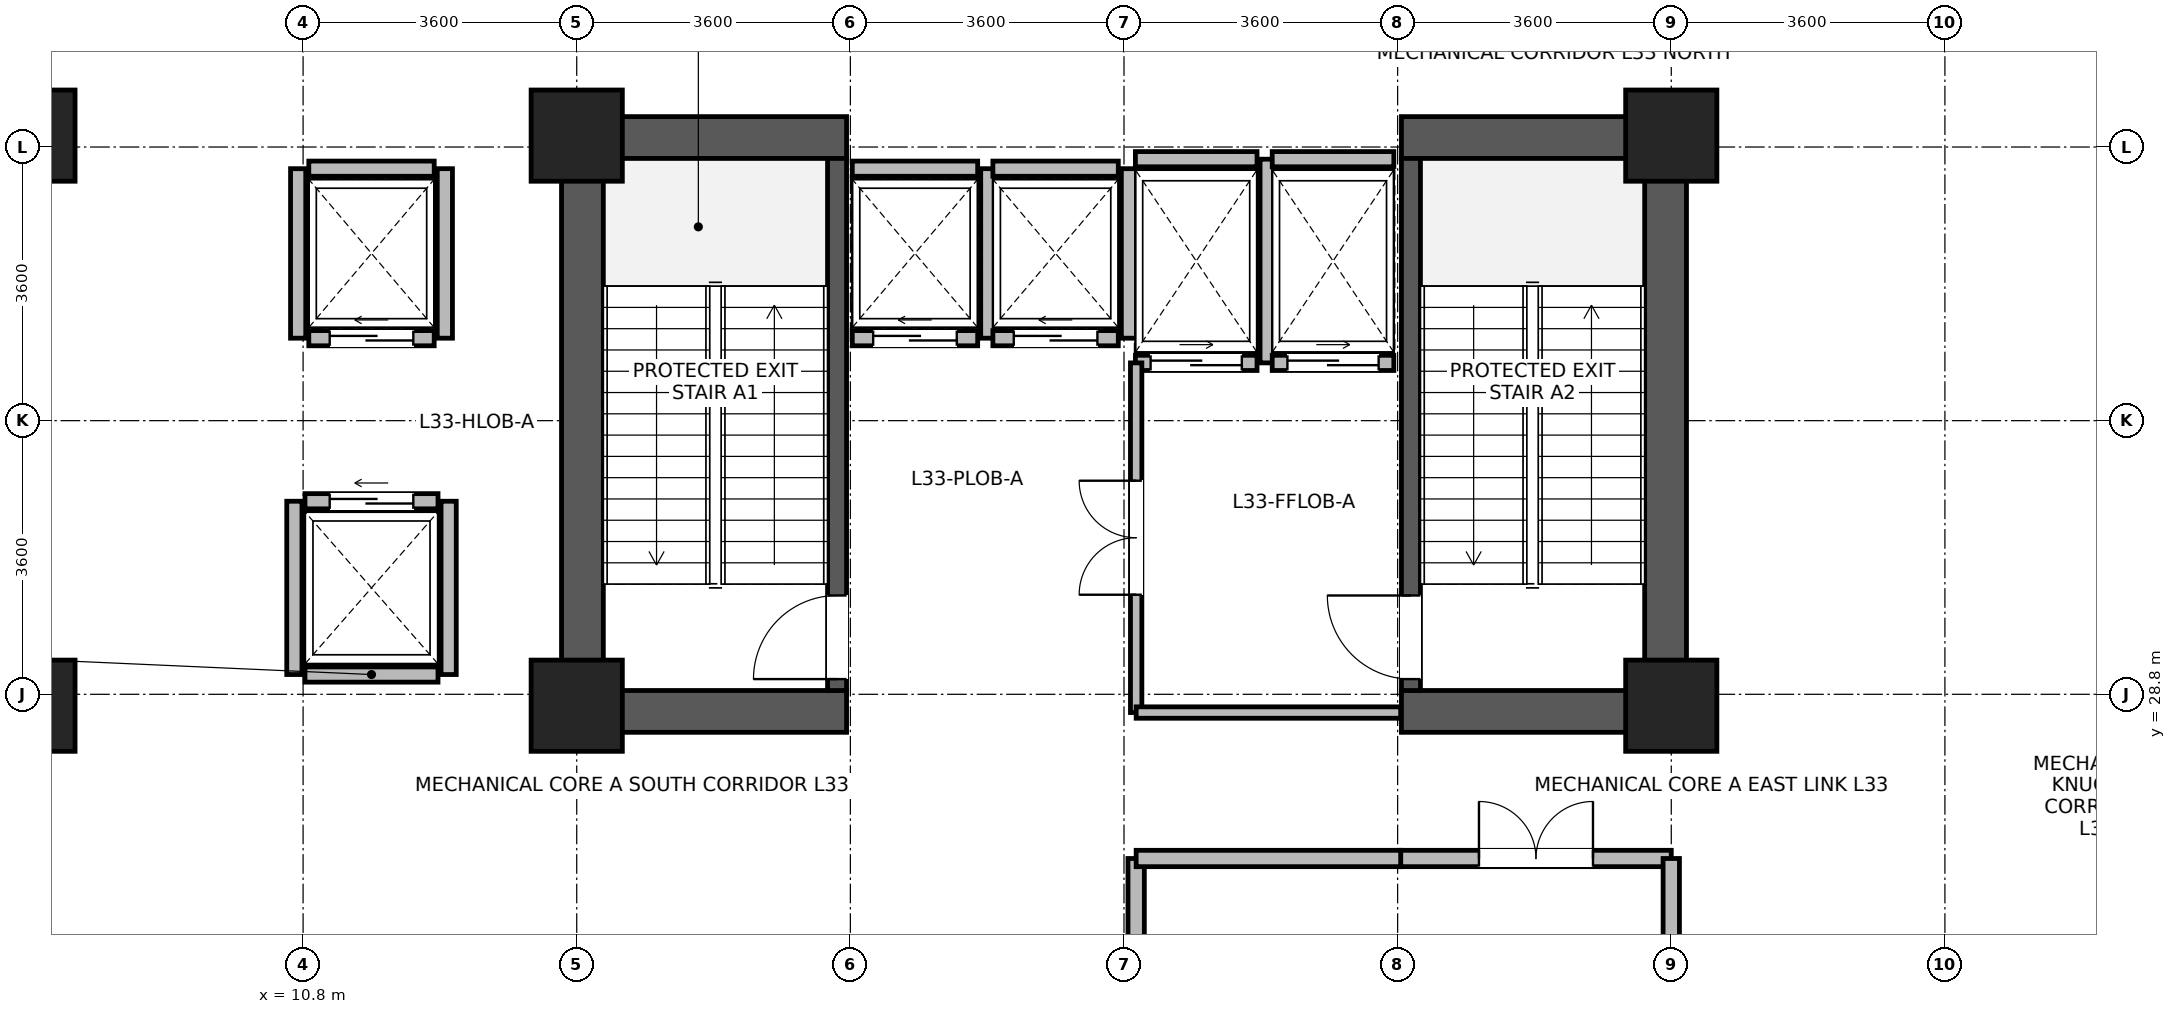
"""IFC4 building model, lengths in metres.
Left out: names, types, materials, properties, quantities, classifications, styles, units other than length and angle.
Written with IfcOpenShell. Run it as: python <this file> out.ifc"""

import sys

from ifc_helpers import new_model, si_unit, direction, frame, frame_2d, origin, origin_2d, place, context, subcontext, project, spatial, rectangle, extrude, source, transform, mapped, element, fill, save


model = new_model("IFC4")
c1 = context("Model", 3, precision=1e-05, world=origin(), true_north=direction((0.0, 1.0)))
c2 = subcontext(c1, "Body", "Model", "MODEL_VIEW")
j1 = project(units=[si_unit("LENGTHUNIT", "METRE"), si_unit("PLANEANGLEUNIT", "RADIAN")], contexts=[c1])
p1 = place(None, origin())
s1 = spatial("IfcSite", under=j1, at=p1, CompositionType="ELEMENT")
p2 = place(p1, origin())
s2 = spatial("IfcBuilding", under=s1, at=p2, CompositionType="ELEMENT")
p3 = place(p2, frame((0.0, 0.0, 130.4)))
s3 = spatial("IfcBuildingStorey", under=s2, at=p3, CompositionType="ELEMENT", Elevation=130.4)
for number, where, z_axis, x_axis in (
    (1, (14.475, 28.3, 0.0), (0.0, 0.0, 1.0), (0.0, 1.0, 0.0)),
    (2, (28.725, 28.3, 0.0), (0.0, 0.0, 1.0), (0.0, 1.0, 0.0)),
):
    element("IfcWall", number, at=place(p3, frame(where, z_axis=z_axis, x_axis=x_axis)), inside=s3, PredefinedType="SHEAR", context=c2, shape_type="SweptSolid", body=[
        extrude(rectangle(XDim=8.1, YDim=0.55, at=frame_2d((4.05, 0.0))), origin(), (0.0, 0.0, 1.0), 4.78),
    ])
for number, where, z_axis, x_axis in (
    (3, (14.75, 28.575, 0.0), (0.0, 0.0, 1.0), (1.0, 0.0, 0.0)),
    (4, (25.25, 28.575, 0.0), (0.0, 0.0, 1.0), (1.0, 0.0, 0.0)),
    (5, (14.75, 36.125, 0.0), (0.0, 0.0, 1.0), (1.0, 0.0, 0.0)),
    (6, (25.25, 36.125, 0.0), (0.0, 0.0, 1.0), (1.0, 0.0, 0.0)),
):
    element("IfcWall", number, at=place(p3, frame(where, z_axis=z_axis, x_axis=x_axis)), inside=s3, PredefinedType="SHEAR", context=c2, shape_type="SweptSolid", body=[
        extrude(rectangle(XDim=3.2, YDim=0.55, at=frame_2d((1.6, 0.0))), origin(), (0.0, 0.0, 1.0), 4.78),
    ])
p4 = place(p3, frame((17.825, 28.85, 0.0), z_axis=(0.0, 0.0, 1.0), x_axis=(0.0, 1.0, 0.0)))
e7 = element("IfcWall", 7, at=p4, inside=s3, PredefinedType="SHEAR", context=c2, shape_type="SweptSolid", body=[
    extrude(rectangle(XDim=7.0, YDim=0.25, at=frame_2d((3.5, 0.0))), origin(), (0.0, 0.0, 1.0), 4.78),
])
p5 = place(p4, frame((0.15, 0.0, 0.0)))
e8 = element("IfcOpeningElement", 8, at=p5, cuts=e7, PredefinedType="OPENING", context=c2, shape_type="SweptSolid", body=[
    extrude(rectangle(XDim=1.1, YDim=2.08, at=frame_2d((0.55, 1.04))), frame((0.0, 0.135, 0.0), z_axis=(0.0, -1.0, 0.0), x_axis=(1.0, 0.0, 0.0)), (0.0, 0.0, 1.0), 0.27),
])
p6 = place(p3, frame((25.375, 28.85, 0.0), z_axis=(0.0, 0.0, 1.0), x_axis=(0.0, 1.0, 0.0)))
e9 = element("IfcWall", 9, at=p6, inside=s3, PredefinedType="SHEAR", context=c2, shape_type="SweptSolid", body=[
    extrude(rectangle(XDim=7.0, YDim=0.25, at=frame_2d((3.5, 0.0))), origin(), (0.0, 0.0, 1.0), 4.78),
])
p7 = place(p6, frame((0.15, 0.0, 0.0)))
e10 = element("IfcOpeningElement", 10, at=p7, cuts=e9, PredefinedType="OPENING", context=c2, shape_type="SweptSolid", body=[
    extrude(rectangle(XDim=1.1, YDim=2.08, at=frame_2d((0.55, 1.04))), frame((0.0, 0.135, 0.0), z_axis=(0.0, -1.0, 0.0), x_axis=(1.0, 0.0, 0.0)), (0.0, 0.0, 1.0), 0.27),
])
m1 = source(origin(), c2, "Body", "SweptSolid", [
    extrude(rectangle(XDim=1.2, YDim=1.2, at=origin_2d()), origin(), (0.0, 0.0, 1.0), 5.2),
])
for number, where, z_axis, x_axis in (
    (11, (7.2, 28.65, 0.0), (0.0, 0.0, 1.0), (1.0, 0.0, 0.0)),
    (12, (7.2, 36.15, 0.0), (0.0, 0.0, 1.0), (1.0, 0.0, 0.0)),
    (13, (14.4, 28.65, 0.0), (0.0, 0.0, 1.0), (1.0, 0.0, 0.0)),
    (14, (14.4, 36.15, 0.0), (0.0, 0.0, 1.0), (1.0, 0.0, 0.0)),
    (15, (28.8, 28.65, 0.0), (0.0, 0.0, 1.0), (1.0, 0.0, 0.0)),
    (16, (28.8, 36.15, 0.0), (0.0, 0.0, 1.0), (1.0, 0.0, 0.0)),
):
    element("IfcColumn", number, at=place(p3, frame(where, z_axis=z_axis, x_axis=x_axis)), inside=s3, PredefinedType="COLUMN", context=c2, shape_type="MappedRepresentation", body=[
        mapped(m1, transform((0.0, 0.0, 0.0), x_axis=(1.0, 0.0, 0.0), y_axis=(0.0, 1.0, 0.0), z_axis=(0.0, 0.0, 1.0), scale=1.0)),
    ])
p8 = place(p3, frame((18.025, 33.485, 0.0), z_axis=(0.0, 0.0, 1.0), x_axis=(1.0, 0.0, 0.0)))
e17 = element("IfcWall", 17, at=p8, inside=s3, PredefinedType="PARTITIONING", context=c2, shape_type="SweptSolid", body=[
    extrude(rectangle(XDim=1.65, YDim=0.2, at=frame_2d((0.825, 0.0))), origin(), (0.0, 0.0, 1.0), 4.76),
])
p9 = place(p8, frame((0.275, 0.0, 0.0)))
e18 = element("IfcOpeningElement", 18, at=p9, cuts=e17, PredefinedType="OPENING", context=c2, shape_type="SweptSolid", body=[
    extrude(rectangle(XDim=1.1, YDim=2.12, at=frame_2d((0.55, 1.06))), frame((0.0, 0.11, 0.0), z_axis=(0.0, -1.0, 0.0), x_axis=(1.0, 0.0, 0.0)), (0.0, 0.0, 1.0), 0.22),
])
p10 = place(p3, frame((18.025, 35.715, 0.0), z_axis=(0.0, 0.0, 1.0), x_axis=(1.0, 0.0, 0.0)))
e19 = element("IfcWall", 19, at=p10, inside=s3, PredefinedType="PARTITIONING", context=c2, shape_type="SweptSolid", body=[
    extrude(rectangle(XDim=1.65, YDim=0.2, at=frame_2d((0.825, 0.0))), origin(), (0.0, 0.0, 1.0), 4.76),
])
p11 = place(p3, frame((19.815, 33.485, 0.0), z_axis=(0.0, 0.0, 1.0), x_axis=(0.0, 1.0, 0.0)))
e20 = element("IfcWall", 20, at=p11, inside=s3, PredefinedType="PARTITIONING", context=c2, shape_type="SweptSolid", body=[
    extrude(rectangle(XDim=2.23, YDim=0.2, at=frame_2d((1.115, 0.0))), origin(), (0.0, 0.0, 1.0), 4.76),
])
p12 = place(p3, frame((19.875, 33.485, 0.0), z_axis=(0.0, 0.0, 1.0), x_axis=(1.0, 0.0, 0.0)))
e21 = element("IfcWall", 21, at=p12, inside=s3, PredefinedType="PARTITIONING", context=c2, shape_type="SweptSolid", body=[
    extrude(rectangle(XDim=1.65, YDim=0.2, at=frame_2d((0.825, 0.0))), origin(), (0.0, 0.0, 1.0), 4.76),
])
p13 = place(p12, frame((0.275, 0.0, 0.0)))
e22 = element("IfcOpeningElement", 22, at=p13, cuts=e21, PredefinedType="OPENING", context=c2, shape_type="SweptSolid", body=[
    extrude(rectangle(XDim=1.1, YDim=2.12, at=frame_2d((0.55, 1.06))), frame((0.0, 0.11, 0.0), z_axis=(0.0, -1.0, 0.0), x_axis=(1.0, 0.0, 0.0)), (0.0, 0.0, 1.0), 0.22),
])
p14 = place(p3, frame((19.875, 35.715, 0.0), z_axis=(0.0, 0.0, 1.0), x_axis=(1.0, 0.0, 0.0)))
e23 = element("IfcWall", 23, at=p14, inside=s3, PredefinedType="PARTITIONING", context=c2, shape_type="SweptSolid", body=[
    extrude(rectangle(XDim=1.65, YDim=0.2, at=frame_2d((0.825, 0.0))), origin(), (0.0, 0.0, 1.0), 4.76),
])
p15 = place(p3, frame((21.665, 33.485, 0.0), z_axis=(0.0, 0.0, 1.0), x_axis=(0.0, 1.0, 0.0)))
e24 = element("IfcWall", 24, at=p15, inside=s3, PredefinedType="PARTITIONING", context=c2, shape_type="SweptSolid", body=[
    extrude(rectangle(XDim=2.23, YDim=0.2, at=frame_2d((1.115, 0.0))), origin(), (0.0, 0.0, 1.0), 4.76),
])
p16 = place(p3, frame((10.825, 29.06, 0.0), z_axis=(0.0, 0.0, 1.0), x_axis=(1.0, 0.0, 0.0)))
e25 = element("IfcWall", 25, at=p16, inside=s3, PredefinedType="PARTITIONING", context=c2, shape_type="SweptSolid", body=[
    extrude(rectangle(XDim=1.75, YDim=0.2, at=frame_2d((0.875, 0.0))), origin(), (0.0, 0.0, 1.0), 4.76),
])
p17 = place(p3, frame((10.825, 31.34, 0.0), z_axis=(0.0, 0.0, 1.0), x_axis=(1.0, 0.0, 0.0)))
e26 = element("IfcWall", 26, at=p17, inside=s3, PredefinedType="PARTITIONING", context=c2, shape_type="SweptSolid", body=[
    extrude(rectangle(XDim=1.75, YDim=0.2, at=frame_2d((0.875, 0.0))), origin(), (0.0, 0.0, 1.0), 4.76),
])
p18 = place(p17, frame((0.325, 0.0, 0.0)))
e27 = element("IfcOpeningElement", 27, at=p18, cuts=e26, PredefinedType="OPENING", context=c2, shape_type="SweptSolid", body=[
    extrude(rectangle(XDim=1.1, YDim=2.12, at=frame_2d((0.55, 1.06))), frame((0.0, 0.11, 0.0), z_axis=(0.0, -1.0, 0.0), x_axis=(1.0, 0.0, 0.0)), (0.0, 0.0, 1.0), 0.22),
])
for number, where, z_axis, x_axis in (
    (28, (10.685, 29.06, 0.0), (0.0, 0.0, 1.0), (0.0, 1.0, 0.0)),
    (29, (12.715, 29.06, 0.0), (0.0, 0.0, 1.0), (0.0, 1.0, 0.0)),
):
    element("IfcWall", number, at=place(p3, frame(where, z_axis=z_axis, x_axis=x_axis)), inside=s3, PredefinedType="PARTITIONING", context=c2, shape_type="SweptSolid", body=[
        extrude(rectangle(XDim=2.28, YDim=0.2, at=frame_2d((1.14, 0.0))), origin(), (0.0, 0.0, 1.0), 4.76),
    ])
p19 = place(p3, frame((10.875, 33.485, 0.0), z_axis=(0.0, 0.0, 1.0), x_axis=(1.0, 0.0, 0.0)))
e30 = element("IfcWall", 30, at=p19, inside=s3, PredefinedType="PARTITIONING", context=c2, shape_type="SweptSolid", body=[
    extrude(rectangle(XDim=1.65, YDim=0.2, at=frame_2d((0.825, 0.0))), origin(), (0.0, 0.0, 1.0), 4.76),
])
p20 = place(p19, frame((0.275, 0.0, 0.0)))
e31 = element("IfcOpeningElement", 31, at=p20, cuts=e30, PredefinedType="OPENING", context=c2, shape_type="SweptSolid", body=[
    extrude(rectangle(XDim=1.1, YDim=2.12, at=frame_2d((0.55, 1.06))), frame((0.0, 0.11, 0.0), z_axis=(0.0, -1.0, 0.0), x_axis=(1.0, 0.0, 0.0)), (0.0, 0.0, 1.0), 0.22),
])
p21 = place(p3, frame((10.875, 35.715, 0.0), z_axis=(0.0, 0.0, 1.0), x_axis=(1.0, 0.0, 0.0)))
e32 = element("IfcWall", 32, at=p21, inside=s3, PredefinedType="PARTITIONING", context=c2, shape_type="SweptSolid", body=[
    extrude(rectangle(XDim=1.65, YDim=0.2, at=frame_2d((0.825, 0.0))), origin(), (0.0, 0.0, 1.0), 4.76),
])
for number, where, z_axis, x_axis in (
    (33, (10.735, 33.485, 0.0), (0.0, 0.0, 1.0), (0.0, 1.0, 0.0)),
    (34, (12.665, 33.485, 0.0), (0.0, 0.0, 1.0), (0.0, 1.0, 0.0)),
):
    element("IfcWall", number, at=place(p3, frame(where, z_axis=z_axis, x_axis=x_axis)), inside=s3, PredefinedType="PARTITIONING", context=c2, shape_type="SweptSolid", body=[
        extrude(rectangle(XDim=2.23, YDim=0.2, at=frame_2d((1.115, 0.0))), origin(), (0.0, 0.0, 1.0), 4.76),
    ])
p22 = place(p3, frame((21.75, 33.16, 0.0), z_axis=(0.0, 0.0, 1.0), x_axis=(1.0, 0.0, 0.0)))
e35 = element("IfcWall", 35, at=p22, inside=s3, PredefinedType="PARTITIONING", context=c2, shape_type="SweptSolid", body=[
    extrude(rectangle(XDim=1.6, YDim=0.2, at=frame_2d((0.8, 0.0))), origin(), (0.0, 0.0, 1.0), 4.76),
])
p23 = place(p22, frame((0.2, 0.0, 0.0)))
e36 = element("IfcOpeningElement", 36, at=p23, cuts=e35, PredefinedType="OPENING", context=c2, shape_type="SweptSolid", body=[
    extrude(rectangle(XDim=1.2, YDim=2.12, at=frame_2d((0.6, 1.06))), frame((0.0, 0.11, 0.0), z_axis=(0.0, -1.0, 0.0), x_axis=(1.0, 0.0, 0.0)), (0.0, 0.0, 1.0), 0.22),
])
p24 = place(p3, frame((21.75, 35.84, 0.0), z_axis=(0.0, 0.0, 1.0), x_axis=(1.0, 0.0, 0.0)))
e37 = element("IfcWall", 37, at=p24, inside=s3, PredefinedType="PARTITIONING", context=c2, shape_type="SweptSolid", body=[
    extrude(rectangle(XDim=1.6, YDim=0.2, at=frame_2d((0.8, 0.0))), origin(), (0.0, 0.0, 1.0), 3.76),
])
p25 = place(p3, frame((23.49, 33.16, 0.0), z_axis=(0.0, 0.0, 1.0), x_axis=(0.0, 1.0, 0.0)))
e38 = element("IfcWall", 38, at=p25, inside=s3, PredefinedType="PARTITIONING", context=c2, shape_type="SweptSolid", body=[
    extrude(rectangle(XDim=2.68, YDim=0.2, at=frame_2d((1.34, 0.0))), origin(), (0.0, 0.0, 1.0), 4.76),
])
p26 = place(p3, frame((23.55, 33.16, 0.0), z_axis=(0.0, 0.0, 1.0), x_axis=(1.0, 0.0, 0.0)))
e39 = element("IfcWall", 39, at=p26, inside=s3, PredefinedType="PARTITIONING", context=c2, shape_type="SweptSolid", body=[
    extrude(rectangle(XDim=1.6, YDim=0.2, at=frame_2d((0.8, 0.0))), origin(), (0.0, 0.0, 1.0), 4.76),
])
p27 = place(p26, frame((0.2, 0.0, 0.0)))
e40 = element("IfcOpeningElement", 40, at=p27, cuts=e39, PredefinedType="OPENING", context=c2, shape_type="SweptSolid", body=[
    extrude(rectangle(XDim=1.2, YDim=2.12, at=frame_2d((0.6, 1.06))), frame((0.0, 0.11, 0.0), z_axis=(0.0, -1.0, 0.0), x_axis=(1.0, 0.0, 0.0)), (0.0, 0.0, 1.0), 0.22),
])
p28 = place(p3, frame((23.55, 35.84, 0.0), z_axis=(0.0, 0.0, 1.0), x_axis=(1.0, 0.0, 0.0)))
e41 = element("IfcWall", 41, at=p28, inside=s3, PredefinedType="PARTITIONING", context=c2, shape_type="SweptSolid", body=[
    extrude(rectangle(XDim=1.6, YDim=0.2, at=frame_2d((0.8, 0.0))), origin(), (0.0, 0.0, 1.0), 3.76),
])
p29 = place(p3, frame((25.24, 26.64, 0.0), z_axis=(0.0, 0.0, 1.0), x_axis=(1.0, 0.0, 0.0)))
e42 = element("IfcWall", 42, at=p29, inside=s3, PredefinedType="PARTITIONING", context=c2, shape_type="SweptSolid", body=[
    extrude(rectangle(XDim=3.56, YDim=0.215, at=frame_2d((1.78, 0.0))), origin(), (0.0, 0.0, 1.0), 4.76),
])
p30 = place(p29, frame((1.03, 0.0, 0.0)))
e43 = element("IfcOpeningElement", 43, at=p30, cuts=e42, PredefinedType="OPENING", context=c2, shape_type="SweptSolid", body=[
    extrude(rectangle(XDim=1.5, YDim=2.1, at=frame_2d((0.75, 1.05))), frame((0.0, 0.118, 0.0), z_axis=(0.0, -1.0, 0.0), x_axis=(1.0, 0.0, 0.0)), (0.0, 0.0, 1.0), 0.235),
])
p31 = place(p3, frame((21.76, 22.2, 0.0), z_axis=(0.0, 0.0, 1.0), x_axis=(0.0, 1.0, 0.0)))
e44 = element("IfcWall", 44, at=p31, inside=s3, PredefinedType="PARTITIONING", context=c2, shape_type="SweptSolid", body=[
    extrude(rectangle(XDim=4.44, YDim=0.215, at=frame_2d((2.22, 0.0))), origin(), (0.0, 0.0, 1.0), 3.16),
])
p32 = place(p3, frame((28.8, 22.2, 0.0), z_axis=(0.0, 0.0, 1.0), x_axis=(0.0, 1.0, 0.0)))
e45 = element("IfcWall", 45, at=p32, inside=s3, PredefinedType="PARTITIONING", context=c2, shape_type="SweptSolid", body=[
    extrude(rectangle(XDim=4.44, YDim=0.215, at=frame_2d((2.22, 0.0))), origin(), (0.0, 0.0, 1.0), 2.96),
])
p33 = place(p3, frame((21.76, 28.56, 0.0), z_axis=(0.0, 0.0, 1.0), x_axis=(0.0, 1.0, 0.0)))
e46 = element("IfcWall", 46, at=p33, inside=s3, PredefinedType="PARTITIONING", context=c2, shape_type="SweptSolid", body=[
    extrude(rectangle(XDim=4.6, YDim=0.15, at=frame_2d((2.3, 0.0))), origin(), (0.0, 0.0, 1.0), 4.76),
])
p34 = place(p33, frame((1.55, 0.0, 0.0)))
e47 = element("IfcOpeningElement", 47, at=p34, cuts=e46, PredefinedType="OPENING", context=c2, shape_type="SweptSolid", body=[
    extrude(rectangle(XDim=1.5, YDim=2.1, at=frame_2d((0.75, 1.05))), frame((0.0, 0.085, 0.0), z_axis=(0.0, -1.0, 0.0), x_axis=(1.0, 0.0, 0.0)), (0.0, 0.0, 1.0), 0.17),
])
p35 = place(p3, frame((21.76, 26.64, 0.0), z_axis=(0.0, 0.0, 1.0), x_axis=(1.0, 0.0, 0.0)))
e48 = element("IfcWall", 48, at=p35, inside=s3, PredefinedType="PARTITIONING", context=c2, shape_type="SweptSolid", body=[
    extrude(rectangle(XDim=3.48, YDim=0.215, at=frame_2d((1.74, 0.0))), origin(), (0.0, 0.0, 1.0), 4.76),
])
p36 = place(p3, frame((21.76, 28.56, 0.0), z_axis=(0.0, 0.0, 1.0), x_axis=(1.0, 0.0, 0.0)))
e49 = element("IfcWall", 49, at=p36, inside=s3, PredefinedType="PARTITIONING", context=c2, shape_type="SweptSolid", body=[
    extrude(rectangle(XDim=3.48, YDim=0.15, at=frame_2d((1.74, 0.0))), origin(), (0.0, 0.0, 1.0), 3.76),
])
p37 = place(p5, origin())
e50 = element("IfcDoor", 50, at=p37, inside=s3, OperationType="SINGLE_SWING_LEFT", PredefinedType="DOOR", context=c2, shape_type="SweptSolid", body=[
    extrude(rectangle(XDim=1.1, YDim=2.08, at=frame_2d((0.55, 1.04))), frame((0.0, 0.025, 0.0), z_axis=(0.0, -1.0, 0.0), x_axis=(1.0, 0.0, 0.0)), (0.0, 0.0, 1.0), 0.05),
])
fill(e8, e50)
p38 = place(p7, origin())
e51 = element("IfcDoor", 51, at=p38, inside=s3, OperationType="SINGLE_SWING_RIGHT", PredefinedType="DOOR", context=c2, shape_type="SweptSolid", body=[
    extrude(rectangle(XDim=1.1, YDim=2.08, at=frame_2d((0.55, 1.04))), frame((0.0, 0.025, 0.0), z_axis=(0.0, -1.0, 0.0), x_axis=(1.0, 0.0, 0.0)), (0.0, 0.0, 1.0), 0.05),
])
fill(e10, e51)
p39 = place(p9, origin())
e52 = element("IfcDoor", 52, at=p39, inside=s3, OperationType="SLIDING_TO_LEFT", PredefinedType="DOOR", context=c2, shape_type="SweptSolid", body=[
    extrude(rectangle(XDim=1.1, YDim=2.12, at=frame_2d((0.55, 1.06))), frame((0.0, 0.025, 0.0), z_axis=(0.0, -1.0, 0.0), x_axis=(1.0, 0.0, 0.0)), (0.0, 0.0, 1.0), 0.05),
])
fill(e18, e52)
p40 = place(p13, origin())
e53 = element("IfcDoor", 53, at=p40, inside=s3, OperationType="SLIDING_TO_LEFT", PredefinedType="DOOR", context=c2, shape_type="SweptSolid", body=[
    extrude(rectangle(XDim=1.1, YDim=2.12, at=frame_2d((0.55, 1.06))), frame((0.0, 0.025, 0.0), z_axis=(0.0, -1.0, 0.0), x_axis=(1.0, 0.0, 0.0)), (0.0, 0.0, 1.0), 0.05),
])
fill(e22, e53)
p41 = place(p18, origin())
e54 = element("IfcDoor", 54, at=p41, inside=s3, OperationType="SLIDING_TO_LEFT", PredefinedType="DOOR", context=c2, shape_type="SweptSolid", body=[
    extrude(rectangle(XDim=1.1, YDim=2.12, at=frame_2d((0.55, 1.06))), frame((0.0, 0.025, 0.0), z_axis=(0.0, -1.0, 0.0), x_axis=(1.0, 0.0, 0.0)), (0.0, 0.0, 1.0), 0.05),
])
fill(e27, e54)
p42 = place(p20, origin())
e55 = element("IfcDoor", 55, at=p42, inside=s3, OperationType="SLIDING_TO_LEFT", PredefinedType="DOOR", context=c2, shape_type="SweptSolid", body=[
    extrude(rectangle(XDim=1.1, YDim=2.12, at=frame_2d((0.55, 1.06))), frame((0.0, 0.025, 0.0), z_axis=(0.0, -1.0, 0.0), x_axis=(1.0, 0.0, 0.0)), (0.0, 0.0, 1.0), 0.05),
])
fill(e31, e55)
p43 = place(p23, origin())
e56 = element("IfcDoor", 56, at=p43, inside=s3, OperationType="SLIDING_TO_RIGHT", PredefinedType="DOOR", context=c2, shape_type="SweptSolid", body=[
    extrude(rectangle(XDim=1.2, YDim=2.12, at=frame_2d((0.6, 1.06))), frame((0.0, 0.025, 0.0), z_axis=(0.0, -1.0, 0.0), x_axis=(1.0, 0.0, 0.0)), (0.0, 0.0, 1.0), 0.05),
])
fill(e36, e56)
p44 = place(p27, origin())
e57 = element("IfcDoor", 57, at=p44, inside=s3, OperationType="SLIDING_TO_RIGHT", PredefinedType="DOOR", context=c2, shape_type="SweptSolid", body=[
    extrude(rectangle(XDim=1.2, YDim=2.12, at=frame_2d((0.6, 1.06))), frame((0.0, 0.025, 0.0), z_axis=(0.0, -1.0, 0.0), x_axis=(1.0, 0.0, 0.0)), (0.0, 0.0, 1.0), 0.05),
])
fill(e40, e57)
p45 = place(p30, origin())
e58 = element("IfcDoor", 58, at=p45, inside=s3, OperationType="DOUBLE_DOOR_SINGLE_SWING", PredefinedType="DOOR", context=c2, shape_type="SweptSolid", body=[
    extrude(rectangle(XDim=1.5, YDim=2.1, at=frame_2d((0.75, 1.05))), frame((0.0, 0.025, 0.0), z_axis=(0.0, -1.0, 0.0), x_axis=(1.0, 0.0, 0.0)), (0.0, 0.0, 1.0), 0.05),
])
fill(e43, e58)
p46 = place(p34, origin())
e59 = element("IfcDoor", 59, at=p46, inside=s3, OperationType="DOUBLE_DOOR_SINGLE_SWING", PredefinedType="DOOR", context=c2, shape_type="SweptSolid", body=[
    extrude(rectangle(XDim=1.5, YDim=2.1, at=frame_2d((0.75, 1.05))), frame((0.0, 0.025, 0.0), z_axis=(0.0, -1.0, 0.0), x_axis=(1.0, 0.0, 0.0)), (0.0, 0.0, 1.0), 0.05),
])
fill(e47, e59)
save(model, sys.argv[1])
